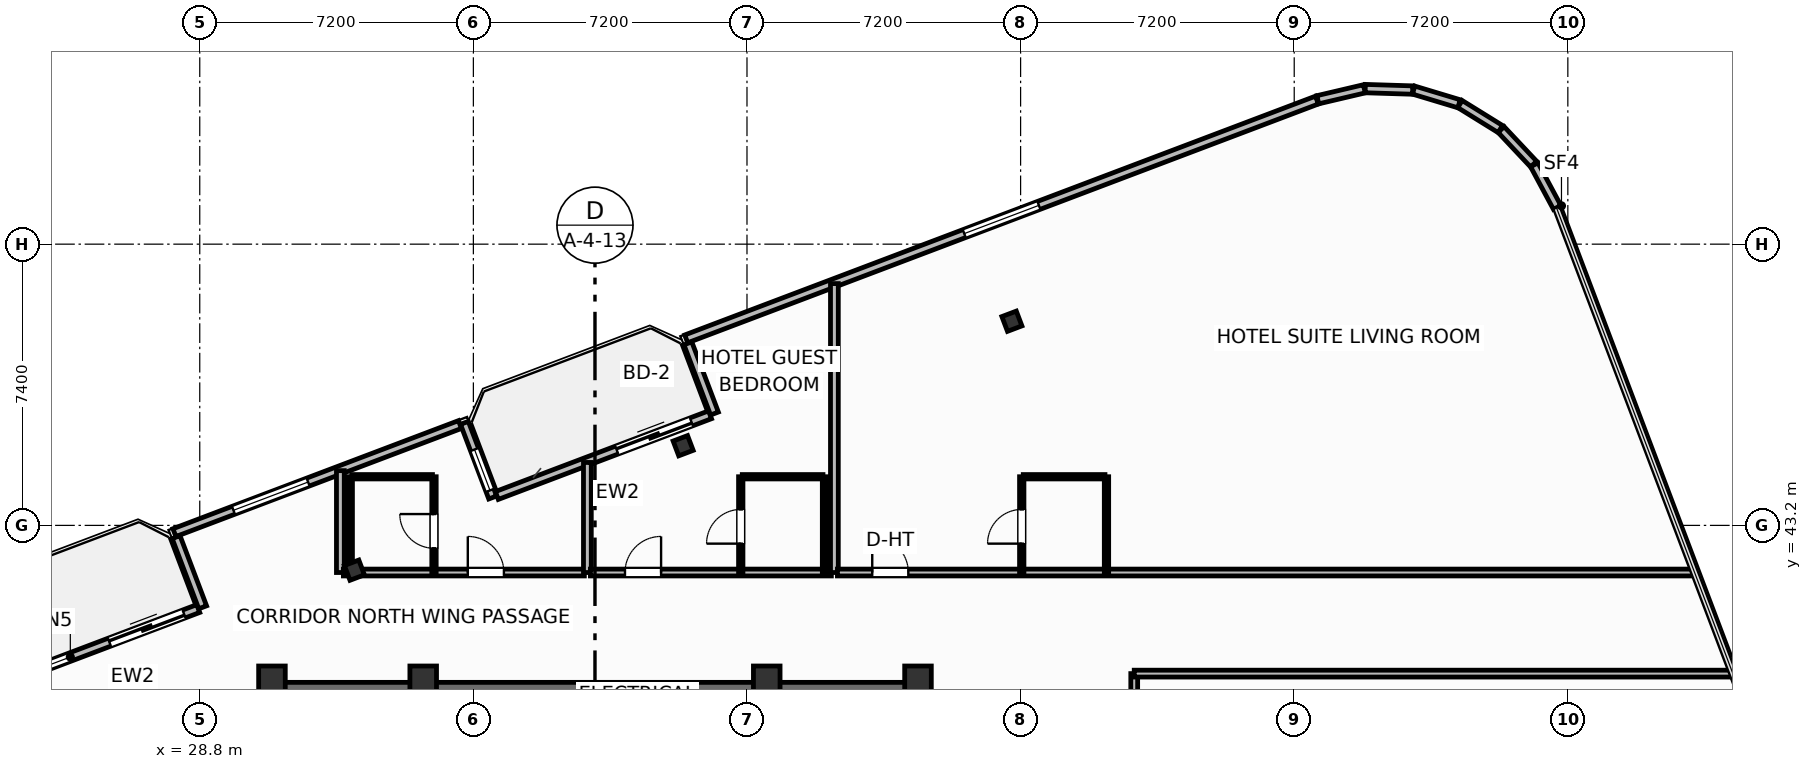
"""IFC4 building model, lengths in metres.
Left out: names, types, materials, properties, quantities, classifications, styles, units other than length and angle.
Written with IfcOpenShell. Run it as: python <this file> out.ifc"""

import sys

from ifc_helpers import new_model, si_unit, direction, frame, frame_2d, origin, origin_2d, place, context, subcontext, project, spatial, rectangle, i_section, extrude, element, fill, save


model = new_model("IFC4")
c1 = context("Model", 3, precision=1e-05, world=origin(), true_north=direction((0.0, 1.0)))
c2 = subcontext(c1, "Body", "Model", "MODEL_VIEW")
j1 = project(units=[si_unit("LENGTHUNIT", "METRE"), si_unit("PLANEANGLEUNIT", "RADIAN")], contexts=[c1])
p1 = place(None, origin())
s1 = spatial("IfcSite", under=j1, at=p1, CompositionType="ELEMENT")
p2 = place(p1, origin())
s2 = spatial("IfcBuilding", under=s1, at=p2, CompositionType="ELEMENT")
p3 = place(p2, frame((0.0, 0.0, 242.3)))
s3 = spatial("IfcBuildingStorey", under=s2, at=p3, CompositionType="ELEMENT", Elevation=242.3)
for number, where, z_axis, x_axis in (
    (1, (30.7, 39.05, 0.0), (0.0, 0.0, 1.0), (1.0, 0.0, 0.0)),
    (2, (34.68, 39.05, 0.0), (0.0, 0.0, 1.0), (1.0, 0.0, 0.0)),
    (3, (43.72, 39.05, 0.0), (0.0, 0.0, 1.0), (1.0, 0.0, 0.0)),
    (4, (47.7, 39.05, 0.0), (0.0, 0.0, 1.0), (1.0, 0.0, 0.0)),
):
    element("IfcColumn", number, at=place(p3, frame(where, z_axis=z_axis, x_axis=x_axis)), inside=s3, PredefinedType="COLUMN", context=c2, shape_type="SweptSolid", body=[
        extrude(rectangle(XDim=0.7, YDim=0.9, at=origin_2d()), origin(), (0.0, 0.0, 1.0), 3.7),
    ])
p4 = place(p3, frame((30.48, 38.745, 0.0), z_axis=(0.0, 0.0, 1.0), x_axis=(1.0, 0.0, 0.0)))
e5 = element("IfcWall", 5, at=p4, inside=s3, PredefinedType="SHEAR", context=c2, shape_type="SweptSolid", body=[
    extrude(rectangle(XDim=17.44, YDim=0.65, at=frame_2d((8.72, 0.0))), origin(), (0.0, 0.0, 1.0), 3.45),
])
for number, where, z_axis, x_axis in (
    (6, (50.171, 48.572, 0.0), (0.0, 0.0, 1.0), (0.935, 0.354, 0.0)),
    (7, (41.52, 45.297, 0.0), (0.0, 0.0, 1.0), (0.935, 0.354, 0.0)),
    (8, (32.869, 42.022, 0.0), (0.0, 0.0, 1.0), (0.935, 0.354, 0.0)),
):
    element("IfcColumn", number, at=place(p3, frame(where, z_axis=z_axis, x_axis=x_axis)), inside=s3, PredefinedType="COLUMN", context=c2, shape_type="SweptSolid", body=[
        extrude(i_section(OverallWidth=0.406, OverallDepth=0.416, WebThickness=0.03, FlangeThickness=0.048, FilletRadius=0.025, at=origin_2d()), origin(), (0.0, 0.0, 1.0), 3.7),
    ])
p5 = place(p3, frame((23.149, 38.887, 0.0), z_axis=(0.0, 0.0, 1.0), x_axis=(0.9352192676, 0.354069091436, 0.0)))
e9 = element("IfcWall", 9, at=p5, inside=s3, PredefinedType="SOLIDWALL", context=c2, shape_type="SweptSolid", body=[
    extrude(rectangle(XDim=6.0, YDim=0.22, at=frame_2d((3.0, 0.0))), origin(), (0.0, 0.0, 1.0), 2.73),
])
p6 = place(p5, frame((3.5, 0.0, 0.0)))
e10 = element("IfcOpeningElement", 10, at=p6, cuts=e9, PredefinedType="OPENING", context=c2, shape_type="SweptSolid", body=[
    extrude(rectangle(XDim=2.1, YDim=2.3, at=frame_2d((1.05, 1.15))), frame((0.0, 0.12, 0.0), z_axis=(0.0, -1.0, 0.0), x_axis=(1.0, 0.0, 0.0)), (0.0, 0.0, 1.0), 0.24),
])
p7 = place(p5, frame((0.55, 0.0, 0.75)))
e11 = element("IfcOpeningElement", 11, at=p7, cuts=e9, PredefinedType="OPENING", context=c2, shape_type="SweptSolid", body=[
    extrude(rectangle(XDim=1.85, YDim=1.75, at=frame_2d((0.925, 0.875))), frame((0.0, 0.12, 0.0), z_axis=(0.0, -1.0, 0.0), x_axis=(1.0, 0.0, 0.0)), (0.0, 0.0, 1.0), 0.24),
])
p8 = place(p3, frame((36.617, 43.986, 0.0), z_axis=(0.0, 0.0, 1.0), x_axis=(0.935227640088, 0.354046976001, 0.0)))
e12 = element("IfcWall", 12, at=p8, inside=s3, PredefinedType="SOLIDWALL", context=c2, shape_type="SweptSolid", body=[
    extrude(rectangle(XDim=6.0, YDim=0.22, at=frame_2d((3.0, 0.0))), origin(), (0.0, 0.0, 1.0), 2.73),
])
p9 = place(p8, frame((3.376, 0.0, 0.0)))
e13 = element("IfcOpeningElement", 13, at=p9, cuts=e12, PredefinedType="OPENING", context=c2, shape_type="SweptSolid", body=[
    extrude(rectangle(XDim=2.1, YDim=2.3, at=frame_2d((1.05, 1.15))), frame((0.0, 0.12, 0.0), z_axis=(0.0, -1.0, 0.0), x_axis=(1.0, 0.0, 0.0)), (0.0, 0.0, 1.0), 0.24),
])
p10 = place(p3, frame((64.519, 51.566, 0.0), z_axis=(0.0, 0.0, 1.0), x_axis=(-0.473093575122, 0.881012184466, 0.0)))
e14 = element("IfcWall", 14, at=p10, inside=s3, PredefinedType="SOLIDWALL", context=c2, shape_type="SweptSolid", body=[
    extrude(rectangle(XDim=1.274, YDim=0.22, at=frame_2d((0.637, 0.0))), origin(), (0.0, 0.0, 1.0), 2.73),
])
for number, where, z_axis, x_axis in (
    (15, (63.899, 52.706, 0.0), (0.0, 0.0, 1.0), (-0.685, 0.729, 0.0)),
    (16, (63.023, 53.629, 0.0), (0.0, 0.0, 1.0), (-0.85, 0.526, 0.0)),
):
    element("IfcWall", number, at=place(p3, frame(where, z_axis=z_axis, x_axis=x_axis)), inside=s3, PredefinedType="SOLIDWALL", context=c2, shape_type="SweptSolid", body=[
        extrude(rectangle(XDim=1.249, YDim=0.22, at=frame_2d((0.625, 0.0))), origin(), (0.0, 0.0, 1.0), 2.73),
    ])
for number, where, z_axis, x_axis in (
    (17, (61.937, 54.294, 0.0), (0.0, 0.0, 1.0), (-0.958, 0.288, 0.0)),
    (18, (60.717, 54.655, 0.0), (0.0, 0.0, 1.0), (-1.0, 0.031, 0.0)),
):
    element("IfcWall", number, at=place(p3, frame(where, z_axis=z_axis, x_axis=x_axis)), inside=s3, PredefinedType="SOLIDWALL", context=c2, shape_type="SweptSolid", body=[
        extrude(rectangle(XDim=1.249, YDim=0.22, at=frame_2d((0.624, 0.0))), origin(), (0.0, 0.0, 1.0), 2.73),
    ])
p11 = place(p3, frame((59.444, 54.688, 0.0), z_axis=(0.0, 0.0, 1.0), x_axis=(-0.973409523464, -0.229071821989, 0.0)))
e19 = element("IfcWall", 19, at=p11, inside=s3, PredefinedType="SOLIDWALL", context=c2, shape_type="SweptSolid", body=[
    extrude(rectangle(XDim=1.257, YDim=0.22, at=frame_2d((0.628, 0.0))), origin(), (0.0, 0.0, 1.0), 2.73),
])
p12 = place(p3, frame((58.198, 54.391, 0.0), z_axis=(0.0, 0.0, 1.0), x_axis=(-0.935223849772, -0.354056988094, 0.0)))
e20 = element("IfcWall", 20, at=p12, inside=s3, PredefinedType="SOLIDWALL", context=c2, shape_type="SweptSolid", body=[
    extrude(rectangle(XDim=17.747, YDim=0.22, at=frame_2d((8.874, 0.0))), origin(), (0.0, 0.0, 1.0), 2.73),
])
p13 = place(p12, frame((7.823, 0.0, 0.8)))
e21 = element("IfcOpeningElement", 21, at=p13, cuts=e20, PredefinedType="OPENING", context=c2, shape_type="SweptSolid", body=[
    extrude(rectangle(XDim=2.1, YDim=1.75, at=frame_2d((1.05, 0.875))), frame((0.0, 0.12, 0.0), z_axis=(0.0, -1.0, 0.0), x_axis=(1.0, 0.0, 0.0)), (0.0, 0.0, 1.0), 0.24),
])
p14 = place(p3, frame((41.645, 47.99, 0.0), z_axis=(0.0, 0.0, 1.0), x_axis=(0.354020680661, -0.935237594232, 0.0)))
e22 = element("IfcWall", 22, at=p14, inside=s3, PredefinedType="SOLIDWALL", context=c2, shape_type="SweptSolid", body=[
    extrude(rectangle(XDim=1.975, YDim=0.22, at=frame_2d((0.988, 0.0))), origin(), (0.0, 0.0, 1.0), 2.73),
])
p15 = place(p3, frame((36.508, 43.934, 0.0), z_axis=(0.0, 0.0, 1.0), x_axis=(-0.354128469405, 0.935196785258, 0.0)))
e23 = element("IfcWall", 23, at=p15, inside=s3, PredefinedType="SOLIDWALL", context=c2, shape_type="SweptSolid", body=[
    extrude(rectangle(XDim=2.1, YDim=0.22, at=frame_2d((1.05, 0.0))), origin(), (0.0, 0.0, 1.0), 2.73),
])
p16 = place(p15, frame((0.2, 0.0, 0.8)))
e24 = element("IfcOpeningElement", 24, at=p16, cuts=e23, PredefinedType="OPENING", context=c2, shape_type="SweptSolid", body=[
    extrude(rectangle(XDim=1.15, YDim=1.4, at=frame_2d((0.575, 0.7))), frame((0.0, 0.12, 0.0), z_axis=(0.0, -1.0, 0.0), x_axis=(1.0, 0.0, 0.0)), (0.0, 0.0, 1.0), 0.24),
])
p17 = place(p3, frame((35.648, 45.854, 0.0), z_axis=(0.0, 0.0, 1.0), x_axis=(-0.935230796934, -0.354038636968, 0.0)))
e25 = element("IfcWall", 25, at=p17, inside=s3, PredefinedType="SOLIDWALL", context=c2, shape_type="SweptSolid", body=[
    extrude(rectangle(XDim=8.035, YDim=0.22, at=frame_2d((4.018, 0.0))), origin(), (0.0, 0.0, 1.0), 2.73),
])
p18 = place(p17, frame((4.273, 0.0, 0.8)))
e26 = element("IfcOpeningElement", 26, at=p18, cuts=e25, PredefinedType="OPENING", context=c2, shape_type="SweptSolid", body=[
    extrude(rectangle(XDim=2.1, YDim=1.75, at=frame_2d((1.05, 0.875))), frame((0.0, 0.12, 0.0), z_axis=(0.0, -1.0, 0.0), x_axis=(1.0, 0.0, 0.0)), (0.0, 0.0, 1.0), 0.24),
])
p19 = place(p3, frame((28.177, 42.892, 0.0), z_axis=(0.0, 0.0, 1.0), x_axis=(0.354061611705, -0.935222099352, 0.0)))
e27 = element("IfcWall", 27, at=p19, inside=s3, PredefinedType="SOLIDWALL", context=c2, shape_type="SweptSolid", body=[
    extrude(rectangle(XDim=1.975, YDim=0.22, at=frame_2d((0.987, 0.0))), origin(), (0.0, 0.0, 1.0), 2.73),
])
p20 = place(p3, frame((32.5, 41.96, 0.0), z_axis=(0.0, 0.0, 1.0), x_axis=(0.0, 1.0, 0.0)))
e28 = element("IfcWall", 28, at=p20, inside=s3, PredefinedType="PARTITIONING", context=c2, shape_type="SweptSolid", body=[
    extrude(rectangle(XDim=2.681, YDim=0.205, at=frame_2d((1.34, 0.0))), origin(), (0.0, 0.0, 1.0), 3.45),
])
p21 = place(p3, frame((32.58, 41.96, 0.0), z_axis=(0.0, 0.0, 1.0), x_axis=(1.0, 0.0, 0.0)))
e29 = element("IfcWall", 29, at=p21, inside=s3, PredefinedType="PARTITIONING", context=c2, shape_type="SweptSolid", body=[
    extrude(rectangle(XDim=6.34, YDim=0.18, at=frame_2d((3.17, 0.0))), origin(), (0.0, 0.0, 1.0), 3.018),
])
p22 = place(p21, frame((3.274, 0.0, 0.0)))
e30 = element("IfcOpeningElement", 30, at=p22, cuts=e29, PredefinedType="OPENING", context=c2, shape_type="SweptSolid", body=[
    extrude(rectangle(XDim=0.95, YDim=2.15, at=frame_2d((0.475, 1.075))), frame((0.0, 0.1, 0.0), z_axis=(0.0, -1.0, 0.0), x_axis=(1.0, 0.0, 0.0)), (0.0, 0.0, 1.0), 0.2),
])
p23 = place(p3, frame((32.8, 44.48, 0.0), z_axis=(0.0, 0.0, 1.0), x_axis=(1.0, 0.0, 0.0)))
e31 = element("IfcWall", 31, at=p23, inside=s3, PredefinedType="PARTITIONING", context=c2, shape_type="SweptSolid", body=[
    extrude(rectangle(XDim=2.124, YDim=0.115, at=frame_2d((1.062, 0.0))), origin(), (0.0, 0.0, 1.0), 3.45),
])
p24 = place(p3, frame((34.964, 41.96, 0.0), z_axis=(0.0, 0.0, 1.0), x_axis=(0.0, 1.0, 0.0)))
e32 = element("IfcWall", 32, at=p24, inside=s3, PredefinedType="PARTITIONING", context=c2, shape_type="SweptSolid", body=[
    extrude(rectangle(XDim=2.52, YDim=0.115, at=frame_2d((1.26, 0.0))), origin(), (0.0, 0.0, 1.0), 3.45),
])
p25 = place(p24, frame((0.638, 0.0, 0.0)))
e33 = element("IfcOpeningElement", 33, at=p25, cuts=e32, PredefinedType="OPENING", context=c2, shape_type="SweptSolid", body=[
    extrude(rectangle(XDim=0.9, YDim=2.05, at=frame_2d((0.45, 1.025))), frame((0.0, 0.067, 0.0), z_axis=(0.0, -1.0, 0.0), x_axis=(1.0, 0.0, 0.0)), (0.0, 0.0, 1.0), 0.135),
])
p26 = place(p3, frame((32.76, 41.96, 0.0), z_axis=(0.0, 0.0, 1.0), x_axis=(0.0, 1.0, 0.0)))
e34 = element("IfcWall", 34, at=p26, inside=s3, PredefinedType="PARTITIONING", context=c2, shape_type="SweptSolid", body=[
    extrude(rectangle(XDim=2.52, YDim=0.115, at=frame_2d((1.26, 0.0))), origin(), (0.0, 0.0, 1.0), 3.45),
])
p27 = place(p3, frame((39.0, 41.96, 0.0), z_axis=(0.0, 0.0, 1.0), x_axis=(0.0, 1.0, 0.0)))
e35 = element("IfcWall", 35, at=p27, inside=s3, PredefinedType="PARTITIONING", context=c2, shape_type="SweptSolid", body=[
    extrude(rectangle(XDim=2.896, YDim=0.205, at=frame_2d((1.448, 0.0))), origin(), (0.0, 0.0, 1.0), 3.45),
])
p28 = place(p3, frame((39.08, 41.96, 0.0), z_axis=(0.0, 0.0, 1.0), x_axis=(1.0, 0.0, 0.0)))
e36 = element("IfcWall", 36, at=p28, inside=s3, PredefinedType="PARTITIONING", context=c2, shape_type="SweptSolid", body=[
    extrude(rectangle(XDim=6.34, YDim=0.18, at=frame_2d((3.17, 0.0))), origin(), (0.0, 0.0, 1.0), 3.45),
])
p29 = place(p28, frame((0.91, 0.0, 0.0)))
e37 = element("IfcOpeningElement", 37, at=p29, cuts=e36, PredefinedType="OPENING", context=c2, shape_type="SweptSolid", body=[
    extrude(rectangle(XDim=0.95, YDim=2.15, at=frame_2d((0.475, 1.075))), frame((0.0, 0.1, 0.0), z_axis=(0.0, -1.0, 0.0), x_axis=(1.0, 0.0, 0.0)), (0.0, 0.0, 1.0), 0.2),
])
p30 = place(p3, frame((43.076, 44.48, 0.0), z_axis=(0.0, 0.0, 1.0), x_axis=(1.0, 0.0, 0.0)))
e38 = element("IfcWall", 38, at=p30, inside=s3, PredefinedType="PARTITIONING", context=c2, shape_type="SweptSolid", body=[
    extrude(rectangle(XDim=2.124, YDim=0.115, at=frame_2d((1.062, 0.0))), origin(), (0.0, 0.0, 1.0), 3.45),
])
p31 = place(p3, frame((43.036, 41.96, 0.0), z_axis=(0.0, 0.0, 1.0), x_axis=(0.0, 1.0, 0.0)))
e39 = element("IfcWall", 39, at=p31, inside=s3, PredefinedType="PARTITIONING", context=c2, shape_type="SweptSolid", body=[
    extrude(rectangle(XDim=2.52, YDim=0.115, at=frame_2d((1.26, 0.0))), origin(), (0.0, 0.0, 1.0), 3.45),
])
p32 = place(p31, frame((0.76, 0.0, 0.0)))
e40 = element("IfcOpeningElement", 40, at=p32, cuts=e39, PredefinedType="OPENING", context=c2, shape_type="SweptSolid", body=[
    extrude(rectangle(XDim=0.9, YDim=2.05, at=frame_2d((0.45, 1.025))), frame((0.0, 0.067, 0.0), z_axis=(0.0, -1.0, 0.0), x_axis=(1.0, 0.0, 0.0)), (0.0, 0.0, 1.0), 0.135),
])
p33 = place(p3, frame((45.24, 41.96, 0.0), z_axis=(0.0, 0.0, 1.0), x_axis=(0.0, 1.0, 0.0)))
e41 = element("IfcWall", 41, at=p33, inside=s3, PredefinedType="PARTITIONING", context=c2, shape_type="SweptSolid", body=[
    extrude(rectangle(XDim=2.52, YDim=0.115, at=frame_2d((1.26, 0.0))), origin(), (0.0, 0.0, 1.0), 3.45),
])
p34 = place(p3, frame((45.5, 41.96, 0.0), z_axis=(0.0, 0.0, 1.0), x_axis=(0.0, 1.0, 0.0)))
e42 = element("IfcWall", 42, at=p34, inside=s3, PredefinedType="PARTITIONING", context=c2, shape_type="SweptSolid", body=[
    extrude(rectangle(XDim=7.602, YDim=0.205, at=frame_2d((3.801, 0.0))), origin(), (0.0, 0.0, 1.0), 3.45),
])
p35 = place(p3, frame((45.58, 41.96, 0.0), z_axis=(0.0, 0.0, 1.0), x_axis=(1.0, 0.0, 0.0)))
e43 = element("IfcWall", 43, at=p35, inside=s3, PredefinedType="PARTITIONING", context=c2, shape_type="SweptSolid", body=[
    extrude(rectangle(XDim=22.516, YDim=0.18, at=frame_2d((11.258, 0.0))), origin(), (0.0, 0.0, 1.0), 3.45),
])
p36 = place(p35, frame((0.916, 0.0, 0.0)))
e44 = element("IfcOpeningElement", 44, at=p36, cuts=e43, PredefinedType="OPENING", context=c2, shape_type="SweptSolid", body=[
    extrude(rectangle(XDim=0.95, YDim=2.15, at=frame_2d((0.475, 1.075))), frame((0.0, 0.1, 0.0), z_axis=(0.0, -1.0, 0.0), x_axis=(1.0, 0.0, 0.0)), (0.0, 0.0, 1.0), 0.2),
])
p37 = place(p3, frame((50.47, 44.48, 0.0), z_axis=(0.0, 0.0, 1.0), x_axis=(1.0, 0.0, 0.0)))
e45 = element("IfcWall", 45, at=p37, inside=s3, PredefinedType="PARTITIONING", context=c2, shape_type="SweptSolid", body=[
    extrude(rectangle(XDim=2.15, YDim=0.115, at=frame_2d((1.075, 0.0))), origin(), (0.0, 0.0, 1.0), 3.45),
])
p38 = place(p3, frame((50.43, 41.96, 0.0), z_axis=(0.0, 0.0, 1.0), x_axis=(0.0, 1.0, 0.0)))
e46 = element("IfcWall", 46, at=p38, inside=s3, PredefinedType="PARTITIONING", context=c2, shape_type="SweptSolid", body=[
    extrude(rectangle(XDim=2.52, YDim=0.115, at=frame_2d((1.26, 0.0))), origin(), (0.0, 0.0, 1.0), 3.45),
])
p39 = place(p38, frame((0.76, 0.0, 0.0)))
e47 = element("IfcOpeningElement", 47, at=p39, cuts=e46, PredefinedType="OPENING", context=c2, shape_type="SweptSolid", body=[
    extrude(rectangle(XDim=0.9, YDim=2.05, at=frame_2d((0.45, 1.025))), frame((0.0, 0.067, 0.0), z_axis=(0.0, -1.0, 0.0), x_axis=(1.0, 0.0, 0.0)), (0.0, 0.0, 1.0), 0.135),
])
p40 = place(p3, frame((52.66, 41.96, 0.0), z_axis=(0.0, 0.0, 1.0), x_axis=(0.0, 1.0, 0.0)))
e48 = element("IfcWall", 48, at=p40, inside=s3, PredefinedType="PARTITIONING", context=c2, shape_type="SweptSolid", body=[
    extrude(rectangle(XDim=2.52, YDim=0.115, at=frame_2d((1.26, 0.0))), origin(), (0.0, 0.0, 1.0), 3.45),
])
p41 = place(p3, frame((53.39, 26.84, 0.0), z_axis=(0.0, 0.0, 1.0), x_axis=(0.0, 1.0, 0.0)))
e49 = element("IfcWall", 49, at=p41, inside=s3, PredefinedType="PARTITIONING", context=c2, shape_type="SweptSolid", body=[
    extrude(rectangle(XDim=12.46, YDim=0.18, at=frame_2d((6.23, 0.0))), origin(), (0.0, 0.0, 1.0), 3.45),
])
p42 = place(p41, frame((0.618, 0.0, 0.0)))
e50 = element("IfcOpeningElement", 50, at=p42, cuts=e49, PredefinedType="OPENING", context=c2, shape_type="SweptSolid", body=[
    extrude(rectangle(XDim=0.92, YDim=2.05, at=frame_2d((0.46, 1.025))), frame((0.0, 0.1, 0.0), z_axis=(0.0, -1.0, 0.0), x_axis=(1.0, 0.0, 0.0)), (0.0, 0.0, 1.0), 0.2),
])
p43 = place(p3, frame((53.39, 39.3, 0.0), z_axis=(0.0, 0.0, 1.0), x_axis=(1.0, 0.0, 0.0)))
e51 = element("IfcWall", 51, at=p43, inside=s3, PredefinedType="PARTITIONING", context=c2, shape_type="SweptSolid", body=[
    extrude(rectangle(XDim=15.713, YDim=0.18, at=frame_2d((7.856, 0.0))), origin(), (0.0, 0.0, 1.0), 3.45),
])
p44 = place(p6, origin())
e52 = element("IfcDoor", 52, at=p44, inside=s3, OperationType="SLIDING_TO_LEFT", PredefinedType="DOOR", context=c2, shape_type="SweptSolid", body=[
    extrude(rectangle(XDim=2.1, YDim=2.3, at=frame_2d((1.05, 1.15))), frame((0.0, 0.025, 0.0), z_axis=(0.0, -1.0, 0.0), x_axis=(1.0, 0.0, 0.0)), (0.0, 0.0, 1.0), 0.05),
])
fill(e10, e52)
p45 = place(p7, origin())
e53 = element("IfcWindow", 53, at=p45, inside=s3, PartitioningType="SINGLE_PANEL", PredefinedType="WINDOW", context=c2, shape_type="SweptSolid", body=[
    extrude(rectangle(XDim=1.85, YDim=1.75, at=frame_2d((0.925, 0.875))), frame((0.0, 0.03, 0.0), z_axis=(0.0, -1.0, 0.0), x_axis=(1.0, 0.0, 0.0)), (0.0, 0.0, 1.0), 0.06),
])
fill(e11, e53)
p46 = place(p9, origin())
e54 = element("IfcDoor", 54, at=p46, inside=s3, OperationType="SLIDING_TO_LEFT", PredefinedType="DOOR", context=c2, shape_type="SweptSolid", body=[
    extrude(rectangle(XDim=2.1, YDim=2.3, at=frame_2d((1.05, 1.15))), frame((0.0, 0.025, 0.0), z_axis=(0.0, -1.0, 0.0), x_axis=(1.0, 0.0, 0.0)), (0.0, 0.0, 1.0), 0.05),
])
fill(e13, e54)
p47 = place(p13, origin())
e55 = element("IfcWindow", 55, at=p47, inside=s3, PartitioningType="SINGLE_PANEL", PredefinedType="WINDOW", context=c2, shape_type="SweptSolid", body=[
    extrude(rectangle(XDim=2.1, YDim=1.75, at=frame_2d((1.05, 0.875))), frame((0.0, 0.03, 0.0), z_axis=(0.0, -1.0, 0.0), x_axis=(1.0, 0.0, 0.0)), (0.0, 0.0, 1.0), 0.06),
])
fill(e21, e55)
p48 = place(p18, origin())
e56 = element("IfcWindow", 56, at=p48, inside=s3, PartitioningType="SINGLE_PANEL", PredefinedType="WINDOW", context=c2, shape_type="SweptSolid", body=[
    extrude(rectangle(XDim=2.1, YDim=1.75, at=frame_2d((1.05, 0.875))), frame((0.0, 0.03, 0.0), z_axis=(0.0, -1.0, 0.0), x_axis=(1.0, 0.0, 0.0)), (0.0, 0.0, 1.0), 0.06),
])
fill(e26, e56)
p49 = place(p22, origin())
e57 = element("IfcDoor", 57, at=p49, inside=s3, OperationType="SINGLE_SWING_LEFT", PredefinedType="DOOR", context=c2, shape_type="SweptSolid", body=[
    extrude(rectangle(XDim=0.95, YDim=2.15, at=frame_2d((0.475, 1.075))), frame((0.0, 0.025, 0.0), z_axis=(0.0, -1.0, 0.0), x_axis=(1.0, 0.0, 0.0)), (0.0, 0.0, 1.0), 0.05),
])
fill(e30, e57)
p50 = place(p25, origin())
e58 = element("IfcDoor", 58, at=p50, inside=s3, OperationType="SINGLE_SWING_RIGHT", PredefinedType="DOOR", context=c2, shape_type="SweptSolid", body=[
    extrude(rectangle(XDim=0.9, YDim=2.05, at=frame_2d((0.45, 1.025))), frame((0.0, 0.025, 0.0), z_axis=(0.0, -1.0, 0.0), x_axis=(1.0, 0.0, 0.0)), (0.0, 0.0, 1.0), 0.05),
])
fill(e33, e58)
p51 = place(p29, origin())
e59 = element("IfcDoor", 59, at=p51, inside=s3, OperationType="SINGLE_SWING_RIGHT", PredefinedType="DOOR", context=c2, shape_type="SweptSolid", body=[
    extrude(rectangle(XDim=0.95, YDim=2.15, at=frame_2d((0.475, 1.075))), frame((0.0, 0.025, 0.0), z_axis=(0.0, -1.0, 0.0), x_axis=(1.0, 0.0, 0.0)), (0.0, 0.0, 1.0), 0.05),
])
fill(e37, e59)
p52 = place(p32, origin())
e60 = element("IfcDoor", 60, at=p52, inside=s3, OperationType="SINGLE_SWING_LEFT", PredefinedType="DOOR", context=c2, shape_type="SweptSolid", body=[
    extrude(rectangle(XDim=0.9, YDim=2.05, at=frame_2d((0.45, 1.025))), frame((0.0, 0.025, 0.0), z_axis=(0.0, -1.0, 0.0), x_axis=(1.0, 0.0, 0.0)), (0.0, 0.0, 1.0), 0.05),
])
fill(e40, e60)
p53 = place(p36, origin())
e61 = element("IfcDoor", 61, at=p53, inside=s3, OperationType="SINGLE_SWING_LEFT", PredefinedType="DOOR", context=c2, shape_type="SweptSolid", body=[
    extrude(rectangle(XDim=0.95, YDim=2.15, at=frame_2d((0.475, 1.075))), frame((0.0, 0.025, 0.0), z_axis=(0.0, -1.0, 0.0), x_axis=(1.0, 0.0, 0.0)), (0.0, 0.0, 1.0), 0.05),
])
fill(e44, e61)
p54 = place(p39, origin())
e62 = element("IfcDoor", 62, at=p54, inside=s3, OperationType="SINGLE_SWING_LEFT", PredefinedType="DOOR", context=c2, shape_type="SweptSolid", body=[
    extrude(rectangle(XDim=0.9, YDim=2.05, at=frame_2d((0.45, 1.025))), frame((0.0, 0.025, 0.0), z_axis=(0.0, -1.0, 0.0), x_axis=(1.0, 0.0, 0.0)), (0.0, 0.0, 1.0), 0.05),
])
fill(e47, e62)
p55 = place(p16, origin())
e63 = element("IfcWindow", 63, at=p55, inside=s3, PartitioningType="SINGLE_PANEL", PredefinedType="WINDOW", context=c2, shape_type="SweptSolid", body=[
    extrude(rectangle(XDim=1.15, YDim=1.4, at=frame_2d((0.575, 0.7))), frame((0.0, 0.03, 0.0), z_axis=(0.0, -1.0, 0.0), x_axis=(1.0, 0.0, 0.0)), (0.0, 0.0, 1.0), 0.06),
])
fill(e24, e63)
save(model, sys.argv[1])
